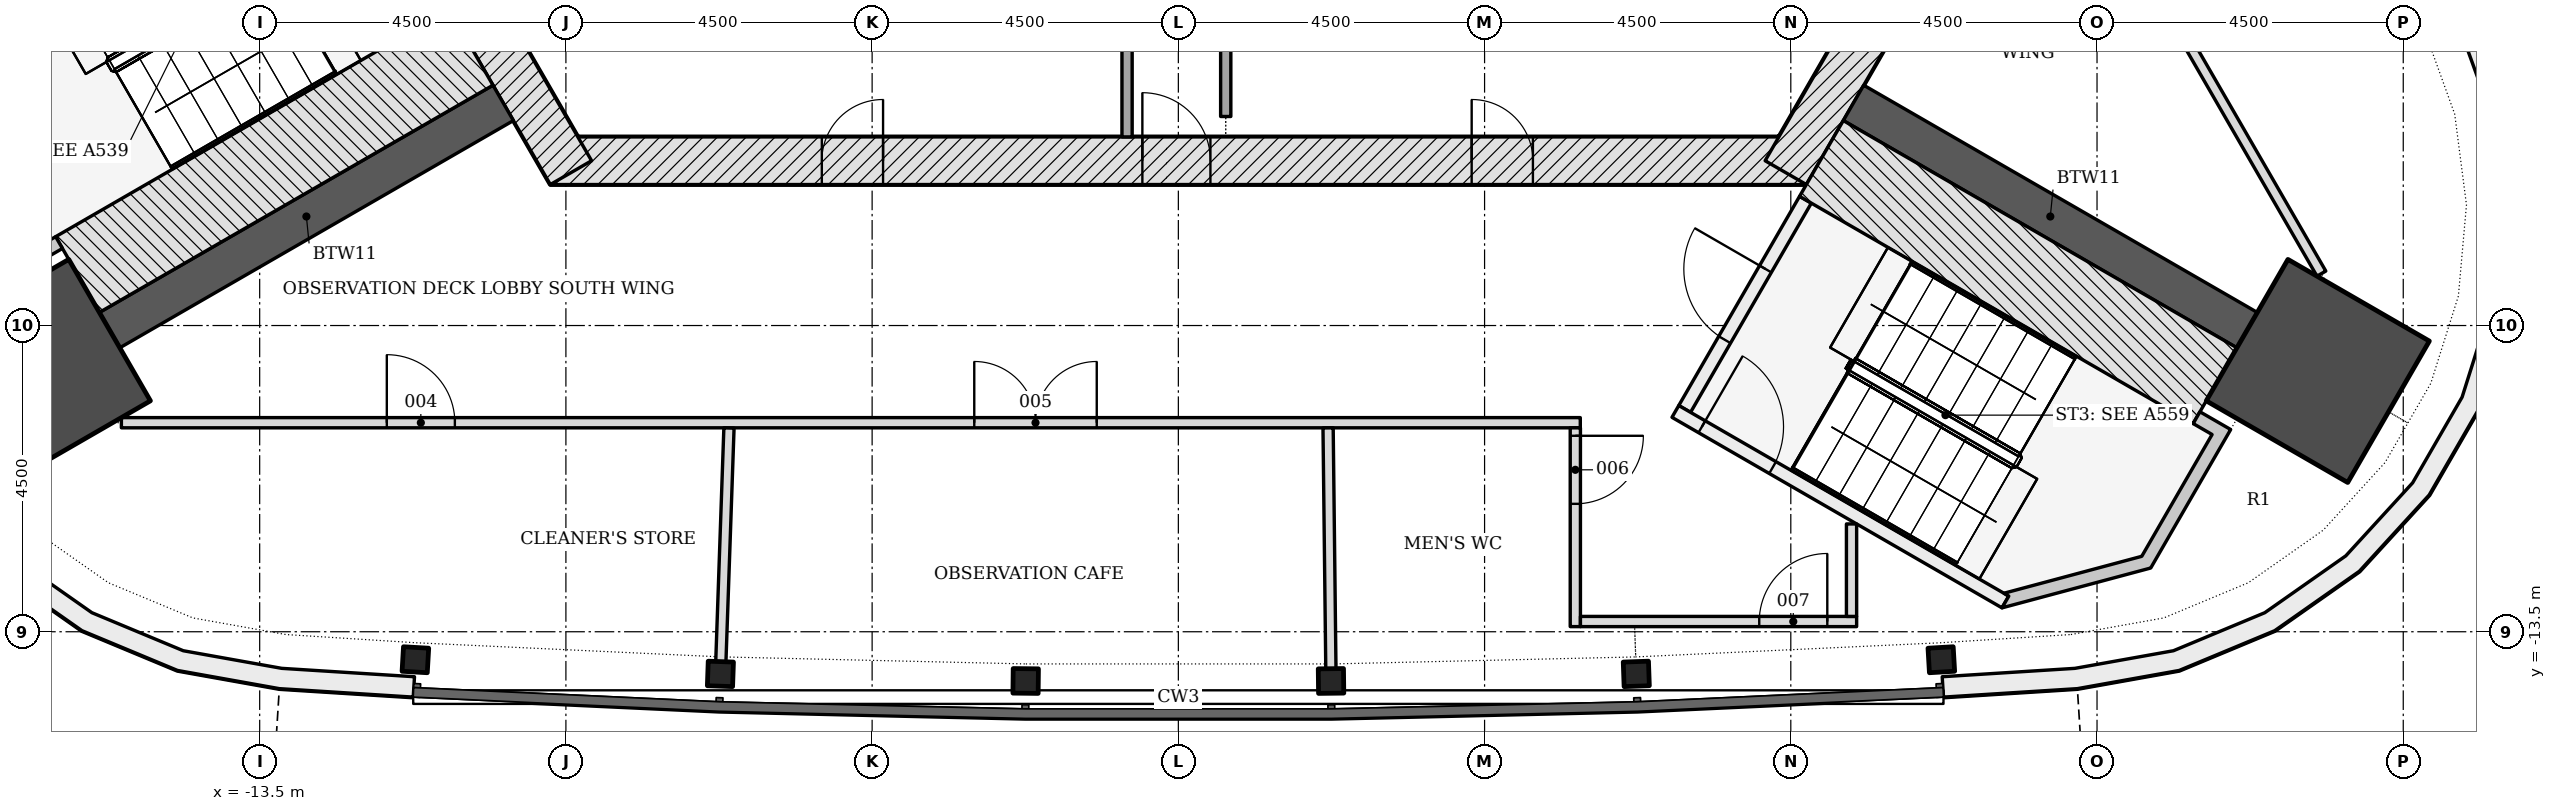
"""IFC4 building model, lengths in metres.
Left out: names, types, materials, properties, quantities, classifications, styles, units other than length and angle.
Written with IfcOpenShell. Run it as: python <this file> out.ifc"""

import sys

from ifc_helpers import new_model, si_unit, direction, frame, frame_2d, origin, origin_2d, place, context, subcontext, project, spatial, polyline, rectangle, i_section, outline, extrude, element, fill, save


model = new_model("IFC4")
c1 = context("Model", 3, precision=1e-05, world=origin(), true_north=direction((0.0, 1.0)))
c2 = subcontext(c1, "Body", "Model", "MODEL_VIEW")
j1 = project(units=[si_unit("LENGTHUNIT", "METRE"), si_unit("PLANEANGLEUNIT", "RADIAN")], contexts=[c1])
p1 = place(None, origin())
s1 = spatial("IfcSite", under=j1, at=p1, CompositionType="ELEMENT")
p2 = place(p1, origin())
s2 = spatial("IfcBuilding", under=s1, at=p2, CompositionType="ELEMENT")
p3 = place(p2, frame((0.0, 0.0, 274.2)))
s3 = spatial("IfcBuildingStorey", under=s2, at=p3, CompositionType="ELEMENT", Elevation=274.2)
p4 = place(p3, frame((-9.229, -6.578, -0.2), z_axis=(0.0, 0.0, 1.0), x_axis=(1.0, 0.0, 0.0)))
e1 = element("IfcWall", 1, at=p4, inside=s3, PredefinedType="SHEAR", context=c2, shape_type="SweptSolid", body=[
    extrude(rectangle(XDim=18.458, YDim=0.7, at=frame_2d((9.229, 0.0))), origin(), (0.0, 0.0, 1.0), 5.35),
])
p5 = place(p4, frame((8.7, 0.0, 0.2)))
e2 = element("IfcOpeningElement", 2, at=p5, cuts=e1, PredefinedType="OPENING", context=c2, shape_type="SweptSolid", body=[
    extrude(rectangle(XDim=1.0, YDim=2.1, at=frame_2d((0.5, 1.05))), frame((0.0, 0.36, 0.0), z_axis=(0.0, -1.0, 0.0), x_axis=(1.0, 0.0, 0.0)), (0.0, 0.0, 1.0), 0.72),
])
p6 = place(p4, frame((3.99, 0.0, 0.2)))
e3 = element("IfcOpeningElement", 3, at=p6, cuts=e1, PredefinedType="OPENING", context=c2, shape_type="SweptSolid", body=[
    extrude(rectangle(XDim=0.9, YDim=2.1, at=frame_2d((0.45, 1.05))), frame((0.0, 0.36, 0.0), z_axis=(0.0, -1.0, 0.0), x_axis=(1.0, 0.0, 0.0)), (0.0, 0.0, 1.0), 0.72),
])
p7 = place(p4, frame((13.539, 0.0, 0.2)))
e4 = element("IfcOpeningElement", 4, at=p7, cuts=e1, PredefinedType="OPENING", context=c2, shape_type="SweptSolid", body=[
    extrude(rectangle(XDim=0.9, YDim=2.1, at=frame_2d((0.45, 1.05))), frame((0.0, 0.36, 0.0), z_axis=(0.0, -1.0, 0.0), x_axis=(1.0, 0.0, 0.0)), (0.0, 0.0, 1.0), 0.72),
])
for number, where, z_axis, x_axis in (
    (5, (8.926, -6.753, -0.2), (0.0, 0.0, 1.0), (0.5, 0.866, 0.0)),
    (6, (-10.311, -4.353, -0.2), (0.0, 0.0, 1.0), (0.5, -0.866, 0.0)),
):
    element("IfcWall", number, at=place(p3, frame(where, z_axis=z_axis, x_axis=x_axis)), inside=s3, PredefinedType="SHEAR", context=c2, shape_type="SweptSolid", body=[
        extrude(rectangle(XDim=2.771, YDim=0.7, at=frame_2d((1.386, 0.0))), origin(), (0.0, 0.0, 1.0), 5.35),
    ])
for number, where, z_axis, x_axis in (
    (7, (-9.922, -5.728, -0.2), (0.0, 0.0, 1.0), (-0.866, -0.5, 0.0)),
    (8, (9.922, -5.728, -0.2), (0.0, 0.0, 1.0), (0.866, -0.5, 0.0)),
):
    element("IfcWall", number, at=place(p3, frame(where, z_axis=z_axis, x_axis=x_axis)), inside=s3, PredefinedType="SHEAR", context=c2, shape_type="SweptSolid", body=[
        extrude(rectangle(XDim=6.678, YDim=0.6, at=frame_2d((3.339, 0.0))), origin(), (0.0, 0.0, 1.0), 5.35),
    ])
for number, where, z_axis, x_axis in (
    (9, (-16.745, -9.667, -0.2), (0.0, 0.0, 1.0), (-0.866, -0.5, 0.0)),
    (10, (16.745, -9.667, -0.2), (0.0, 0.0, 1.0), (0.866, -0.5, 0.0)),
):
    element("IfcColumn", number, at=place(p3, frame(where, z_axis=z_axis, x_axis=x_axis)), inside=s3, PredefinedType="COLUMN", context=c2, shape_type="SweptSolid", body=[
        extrude(rectangle(XDim=2.4, YDim=2.4, at=origin_2d()), origin(), (0.0, 0.0, 1.0), 5.35),
    ])
for number, where, z_axis, x_axis in (
    (11, (-11.212, -13.911, -0.2), (0.0, 0.0, 1.0), (0.998, -0.058, 0.0)),
    (12, (-6.729, -14.119, -0.2), (0.0, 0.0, 1.0), (0.999, -0.035, 0.0)),
    (13, (-2.244, -14.224, -0.2), (0.0, 0.0, 1.0), (1.0, -0.012, 0.0)),
    (14, (2.244, -14.224, -0.2), (0.0, 0.0, 1.0), (1.0, 0.012, 0.0)),
    (15, (6.729, -14.119, -0.2), (0.0, 0.0, 1.0), (0.999, 0.035, 0.0)),
    (16, (11.212, -13.911, -0.2), (0.0, 0.0, 1.0), (0.998, 0.058, 0.0)),
):
    element("IfcColumn", number, at=place(p3, frame(where, z_axis=z_axis, x_axis=x_axis)), inside=s3, PredefinedType="COLUMN", context=c2, shape_type="SweptSolid", body=[
        extrude(i_section(OverallWidth=0.371, OverallDepth=0.361, WebThickness=0.012, FlangeThickness=0.02, FilletRadius=0.015, at=origin_2d()), origin(), (0.0, 0.0, 1.0), 5.35),
    ])
p8 = place(p3, origin())
e17 = element("IfcWall", 17, at=p8, inside=s3, PredefinedType="NOTDEFINED", context=c2, shape_type="SweptSolid", body=[
    extrude(outline(polyline([(-18.145, -2.507), (-19.021, -4.273), (-19.538, -5.703), (-19.733, -7.21), (-19.599, -8.724), (-19.141, -10.174), (-18.381, -11.49), (-17.355, -12.611), (-16.111, -13.485), (-14.708, -14.069), (-13.211, -14.336), (-11.244, -14.46), (-11.225, -14.161), (-13.176, -14.038), (-14.623, -13.779), (-15.965, -13.22), (-17.156, -12.385), (-18.138, -11.312), (-18.865, -10.052), (-19.303, -8.665), (-19.432, -7.216), (-19.244, -5.774), (-18.745, -4.391), (-17.876, -2.64), (-18.145, -2.507)])), origin(), (0.0, 0.0, 1.0), 5.15),
])
p9 = place(p3, origin())
e18 = element("IfcWall", 18, at=p9, inside=s3, PredefinedType="NOTDEFINED", context=c2, shape_type="SweptSolid", body=[
    extrude(outline(polyline([(11.244, -14.46), (13.211, -14.336), (14.708, -14.069), (16.111, -13.485), (17.355, -12.611), (18.381, -11.49), (19.141, -10.174), (19.599, -8.724), (19.733, -7.21), (19.538, -5.703), (19.021, -4.273), (18.145, -2.507), (17.876, -2.64), (18.745, -4.391), (19.244, -5.774), (19.432, -7.216), (19.303, -8.665), (18.865, -10.052), (18.138, -11.312), (17.156, -12.385), (15.965, -13.22), (14.623, -13.779), (13.176, -14.038), (11.225, -14.161), (11.244, -14.46)])), origin(), (0.0, 0.0, 1.0), 5.15),
])
p10 = place(p3, frame((-0.754, 5.272, 0.0), z_axis=(0.0, 0.0, 1.0), x_axis=(0.0, -1.0, 0.0)))
e19 = element("IfcWall", 19, at=p10, inside=s3, PredefinedType="PARTITIONING", context=c2, shape_type="SweptSolid", body=[
    extrude(rectangle(XDim=11.5, YDim=0.15, at=frame_2d((5.75, 0.0))), origin(), (0.0, 0.0, 1.0), 5.15),
])
p11 = place(p10, frame((3.701, 0.0, 0.0)))
e20 = element("IfcOpeningElement", 20, at=p11, cuts=e19, PredefinedType="OPENING", context=c2, shape_type="SweptSolid", body=[
    extrude(rectangle(XDim=0.9, YDim=2.1, at=frame_2d((0.45, 1.05))), frame((0.0, 0.085, 0.0), z_axis=(0.0, -1.0, 0.0), x_axis=(1.0, 0.0, 0.0)), (0.0, 0.0, 1.0), 0.17),
])
p12 = place(p3, frame((0.696, -5.928, 0.0), z_axis=(0.0, 0.0, 1.0), x_axis=(0.0, 1.0, 0.0)))
e21 = element("IfcWall", 21, at=p12, inside=s3, PredefinedType="PARTITIONING", context=c2, shape_type="SweptSolid", body=[
    extrude(rectangle(XDim=11.549, YDim=0.15, at=frame_2d((5.774, 0.0))), origin(), (0.0, 0.0, 1.0), 5.15),
])
p13 = place(p12, frame((6.6, 0.0, 0.0)))
e22 = element("IfcOpeningElement", 22, at=p13, cuts=e21, PredefinedType="OPENING", context=c2, shape_type="SweptSolid", body=[
    extrude(rectangle(XDim=0.9, YDim=2.1, at=frame_2d((0.45, 1.05))), frame((0.0, 0.085, 0.0), z_axis=(0.0, -1.0, 0.0), x_axis=(1.0, 0.0, 0.0)), (0.0, 0.0, 1.0), 0.17),
])
p14 = place(p3, frame((-10.393, -4.912, -0.2), z_axis=(0.0, 0.0, 1.0), x_axis=(-0.866025486527, -0.499999856685, 0.0)))
e23 = element("IfcWall", 23, at=p14, inside=s3, PredefinedType="SHEAR", context=c2, shape_type="SweptSolid", body=[
    extrude(rectangle(XDim=6.679, YDim=1.286, at=frame_2d((3.339, 0.0))), origin(), (0.0, 0.0, 1.0), 5.35),
])
p15 = place(p3, frame((0.0, 0.0, -0.2)))
e24 = element("IfcWall", 24, at=p15, inside=s3, PredefinedType="SHEAR", context=c2, shape_type="SweptSolid", body=[
    extrude(outline(polyline([(-17.439, -3.907), (-18.025, -6.093), (-16.85, -8.128), (-16.398, -7.867), (-16.498, -7.694), (-16.498, -7.694), (-16.777, -7.855), (-17.81, -6.065), (-17.267, -4.039), (-17.339, -4.081), (-17.339, -4.081), (-17.339, -4.081), (-17.339, -4.081), (-17.339, -4.081), (-17.339, -4.081), (-17.339, -4.081), (-17.339, -4.081), (-17.339, -4.081), (-17.339, -4.081), (-17.339, -4.081), (-17.339, -4.081), (-17.339, -4.081), (-17.339, -4.081), (-17.339, -4.081), (-17.339, -4.081), (-17.339, -4.081), (-17.439, -3.907)])), origin(), (0.0, 0.0, 1.0), 5.35),
])
p16 = place(p3, frame((7.44, -10.226, -0.2), z_axis=(0.0, 0.0, 1.0), x_axis=(0.500022077904, 0.866012656725, 0.0)))
e25 = element("IfcWall", 25, at=p16, inside=s3, PredefinedType="SHEAR", context=c2, shape_type="SweptSolid", body=[
    extrude(rectangle(XDim=3.55, YDim=0.2, at=frame_2d((1.775, 0.0))), origin(), (0.0, 0.0, 1.0), 5.35),
])
p17 = place(p16, frame((1.175, 0.0, 0.2)))
e26 = element("IfcOpeningElement", 26, at=p17, cuts=e25, PredefinedType="OPENING", context=c2, shape_type="SweptSolid", body=[
    extrude(rectangle(XDim=1.2, YDim=2.1, at=frame_2d((0.6, 1.05))), frame((0.0, 0.11, 0.0), z_axis=(0.0, -1.0, 0.0), x_axis=(1.0, 0.0, 0.0)), (0.0, 0.0, 1.0), 0.22),
])
p18 = place(p3, frame((7.304, -10.262, -0.2), z_axis=(0.0, 0.0, 1.0), x_axis=(0.866026594901, -0.49999793692, 0.0)))
e27 = element("IfcWall", 27, at=p18, inside=s3, PredefinedType="SHEAR", context=c2, shape_type="SweptSolid", body=[
    extrude(rectangle(XDim=5.6, YDim=0.2, at=frame_2d((2.8, 0.0))), origin(), (0.0, 0.0, 1.0), 5.35),
])
p19 = place(p18, frame((0.45, 0.0, 0.2)))
e28 = element("IfcOpeningElement", 28, at=p19, cuts=e27, PredefinedType="OPENING", context=c2, shape_type="SweptSolid", body=[
    extrude(rectangle(XDim=1.2, YDim=2.1, at=frame_2d((0.6, 1.05))), frame((0.0, 0.11, 0.0), z_axis=(0.0, -1.0, 0.0), x_axis=(1.0, 0.0, 0.0)), (0.0, 0.0, 1.0), 0.22),
])
p20 = place(p3, frame((9.45, -6.545, -0.2), z_axis=(0.0, 0.0, 1.0), x_axis=(0.866016347338, -0.500015685897, 0.0)))
e29 = element("IfcWall", 29, at=p20, inside=s3, PredefinedType="SHEAR", context=c2, shape_type="SweptSolid", body=[
    extrude(rectangle(XDim=6.678, YDim=1.286, at=frame_2d((3.339, 0.0))), origin(), (0.0, 0.0, 1.0), 5.35),
])
p21 = place(p3, frame((0.0, 0.0, -0.2)))
e30 = element("IfcWall", 30, at=p21, inside=s3, PredefinedType="SHEAR", context=c2, shape_type="SweptSolid", body=[
    extrude(outline(polyline([(12.104, -13.149), (14.289, -12.563), (15.464, -10.528), (15.013, -10.268), (14.913, -10.441), (15.191, -10.601), (14.157, -12.392), (12.132, -12.934), (12.204, -12.976), (12.204, -12.976), (12.204, -12.976), (12.204, -12.976), (12.204, -12.976), (12.204, -12.976), (12.204, -12.976), (12.204, -12.976), (12.204, -12.976), (12.204, -12.976), (12.204, -12.976), (12.204, -12.976), (12.204, -12.976), (12.204, -12.976), (12.204, -12.976), (12.204, -12.976), (12.204, -12.976), (12.104, -13.149)])), origin(), (0.0, 0.0, 1.0), 5.35),
])
p22 = place(p3, frame((-15.532, -10.428, 0.0), z_axis=(0.0, 0.0, 1.0), x_axis=(1.0, 0.0, 0.0)))
e31 = element("IfcWall", 31, at=p22, inside=s3, PredefinedType="PARTITIONING", context=c2, shape_type="SweptSolid", body=[
    extrude(rectangle(XDim=21.439, YDim=0.15, at=frame_2d((10.719, 0.0))), origin(), (0.0, 0.0, 1.0), 4.602),
])
p23 = place(p22, frame((3.901, 0.0, 0.0)))
e32 = element("IfcOpeningElement", 32, at=p23, cuts=e31, PredefinedType="OPENING", context=c2, shape_type="SweptSolid", body=[
    extrude(rectangle(XDim=1.0, YDim=2.1, at=frame_2d((0.5, 1.05))), frame((0.0, 0.085, 0.0), z_axis=(0.0, -1.0, 0.0), x_axis=(1.0, 0.0, 0.0)), (0.0, 0.0, 1.0), 0.17),
])
p24 = place(p22, frame((12.533, 0.0, 0.0)))
e33 = element("IfcOpeningElement", 33, at=p24, cuts=e31, PredefinedType="OPENING", context=c2, shape_type="SweptSolid", body=[
    extrude(rectangle(XDim=1.8, YDim=2.1, at=frame_2d((0.9, 1.05))), frame((0.0, 0.085, 0.0), z_axis=(0.0, -1.0, 0.0), x_axis=(1.0, 0.0, 0.0)), (0.0, 0.0, 1.0), 0.17),
])
p25 = place(p3, frame((-6.723, -13.945, 0.0), z_axis=(0.0, 0.0, 1.0), x_axis=(0.034767749757, 0.999395419029, 0.0)))
e34 = element("IfcWall", 34, at=p25, inside=s3, PredefinedType="PARTITIONING", context=c2, shape_type="SweptSolid", body=[
    extrude(rectangle(XDim=3.441, YDim=0.15, at=frame_2d((1.72, 0.0))), origin(), (0.0, 0.0, 1.0), 4.602),
])
p26 = place(p3, frame((2.2, -10.504, 0.0), z_axis=(0.0, 0.0, 1.0), x_axis=(0.011571067151, -0.999933052962, 0.0)))
e35 = element("IfcWall", 35, at=p26, inside=s3, PredefinedType="PARTITIONING", context=c2, shape_type="SweptSolid", body=[
    extrude(rectangle(XDim=3.545, YDim=0.15, at=frame_2d((1.772, 0.0))), origin(), (0.0, 0.0, 1.0), 4.602),
])
p27 = place(p3, frame((5.833, -10.503, 0.0), z_axis=(0.0, 0.0, 1.0), x_axis=(0.0, -1.0, 0.0)))
e36 = element("IfcWall", 36, at=p27, inside=s3, PredefinedType="PARTITIONING", context=c2, shape_type="SweptSolid", body=[
    extrude(rectangle(XDim=2.922, YDim=0.15, at=frame_2d((1.461, 0.0))), origin(), (0.0, 0.0, 1.0), 5.15),
])
p28 = place(p27, frame((0.117, 0.0, 0.0)))
e37 = element("IfcOpeningElement", 37, at=p28, cuts=e36, PredefinedType="OPENING", context=c2, shape_type="SweptSolid", body=[
    extrude(rectangle(XDim=1.0, YDim=2.1, at=frame_2d((0.5, 1.05))), frame((0.0, 0.085, 0.0), z_axis=(0.0, -1.0, 0.0), x_axis=(1.0, 0.0, 0.0)), (0.0, 0.0, 1.0), 0.17),
])
p29 = place(p3, frame((5.909, -13.35, 0.0), z_axis=(0.0, 0.0, 1.0), x_axis=(1.0, 0.0, 0.0)))
e38 = element("IfcWall", 38, at=p29, inside=s3, PredefinedType="PARTITIONING", context=c2, shape_type="SweptSolid", body=[
    extrude(rectangle(XDim=4.059, YDim=0.15, at=frame_2d((2.029, 0.0))), origin(), (0.0, 0.0, 1.0), 4.602),
])
p30 = place(p29, frame((2.628, 0.0, 0.0)))
e39 = element("IfcOpeningElement", 39, at=p30, cuts=e38, PredefinedType="OPENING", context=c2, shape_type="SweptSolid", body=[
    extrude(rectangle(XDim=1.0, YDim=2.1, at=frame_2d((0.5, 1.05))), frame((0.0, 0.085, 0.0), z_axis=(0.0, -1.0, 0.0), x_axis=(1.0, 0.0, 0.0)), (0.0, 0.0, 1.0), 0.17),
])
p31 = place(p3, frame((9.893, -13.275, 0.0), z_axis=(0.0, 0.0, 1.0), x_axis=(0.0, 1.0, 0.0)))
e40 = element("IfcWall", 40, at=p31, inside=s3, PredefinedType="PARTITIONING", context=c2, shape_type="SweptSolid", body=[
    extrude(rectangle(XDim=1.359, YDim=0.15, at=frame_2d((0.68, 0.0))), origin(), (0.0, 0.0, 1.0), 5.15),
])
p32 = place(p3, frame((6.078, 10.329, 0.0), z_axis=(0.0, 0.0, 1.0), x_axis=(0.499992222505, -0.866029894076, 0.0)))
e41 = element("IfcWall", 41, at=p32, inside=s3, PredefinedType="PARTITIONING", context=c2, shape_type="SweptSolid", body=[
    extrude(rectangle(XDim=21.439, YDim=0.15, at=frame_2d((10.719, 0.0))), origin(), (0.0, 0.0, 1.0), 4.602),
])
p33 = place(p32, frame((14.337, 0.0, 0.0)))
e42 = element("IfcOpeningElement", 42, at=p33, cuts=e41, PredefinedType="OPENING", context=c2, shape_type="SweptSolid", body=[
    extrude(rectangle(XDim=1.0, YDim=2.1, at=frame_2d((0.5, 1.05))), frame((0.0, 0.085, 0.0), z_axis=(0.0, -1.0, 0.0), x_axis=(1.0, 0.0, 0.0)), (0.0, 0.0, 1.0), 0.17),
])
p34 = place(p32, frame((5.51, 0.0, 0.0)))
e43 = element("IfcOpeningElement", 43, at=p34, cuts=e41, PredefinedType="OPENING", context=c2, shape_type="SweptSolid", body=[
    extrude(rectangle(XDim=1.0, YDim=2.1, at=frame_2d((0.5, 1.05))), frame((0.0, 0.085, 0.0), z_axis=(0.0, -1.0, 0.0), x_axis=(1.0, 0.0, 0.0)), (0.0, 0.0, 1.0), 0.17),
])
p35 = place(p5, origin())
e44 = element("IfcDoor", 44, at=p35, inside=s3, OperationType="SINGLE_SWING_LEFT", PredefinedType="DOOR", context=c2, shape_type="SweptSolid", body=[
    extrude(rectangle(XDim=1.0, YDim=2.1, at=frame_2d((0.5, 1.05))), frame((0.0, 0.075, 0.0), z_axis=(0.0, -1.0, 0.0), x_axis=(1.0, 0.0, 0.0)), (0.0, 0.0, 1.0), 0.15),
])
fill(e2, e44)
p36 = place(p6, origin())
e45 = element("IfcDoor", 45, at=p36, inside=s3, OperationType="SINGLE_SWING_RIGHT", PredefinedType="DOOR", context=c2, shape_type="SweptSolid", body=[
    extrude(rectangle(XDim=0.9, YDim=2.1, at=frame_2d((0.45, 1.05))), frame((0.0, 0.075, 0.0), z_axis=(0.0, -1.0, 0.0), x_axis=(1.0, 0.0, 0.0)), (0.0, 0.0, 1.0), 0.15),
])
fill(e3, e45)
p37 = place(p7, origin())
e46 = element("IfcDoor", 46, at=p37, inside=s3, OperationType="SINGLE_SWING_LEFT", PredefinedType="DOOR", context=c2, shape_type="SweptSolid", body=[
    extrude(rectangle(XDim=0.9, YDim=2.1, at=frame_2d((0.45, 1.05))), frame((0.0, 0.075, 0.0), z_axis=(0.0, -1.0, 0.0), x_axis=(1.0, 0.0, 0.0)), (0.0, 0.0, 1.0), 0.15),
])
fill(e4, e46)
p38 = place(p17, origin())
e47 = element("IfcDoor", 47, at=p38, inside=s3, OperationType="SINGLE_SWING_RIGHT", PredefinedType="DOOR", context=c2, shape_type="SweptSolid", body=[
    extrude(rectangle(XDim=1.2, YDim=2.1, at=frame_2d((0.6, 1.05))), frame((0.0, 0.025, 0.0), z_axis=(0.0, -1.0, 0.0), x_axis=(1.0, 0.0, 0.0)), (0.0, 0.0, 1.0), 0.05),
])
fill(e26, e47)
p39 = place(p19, origin())
e48 = element("IfcDoor", 48, at=p39, inside=s3, OperationType="SINGLE_SWING_LEFT", PredefinedType="DOOR", context=c2, shape_type="SweptSolid", body=[
    extrude(rectangle(XDim=1.2, YDim=2.1, at=frame_2d((0.6, 1.05))), frame((0.0, 0.025, 0.0), z_axis=(0.0, -1.0, 0.0), x_axis=(1.0, 0.0, 0.0)), (0.0, 0.0, 1.0), 0.05),
])
fill(e28, e48)
p40 = place(p23, origin())
e49 = element("IfcDoor", 49, at=p40, inside=s3, OperationType="SINGLE_SWING_LEFT", PredefinedType="DOOR", context=c2, shape_type="SweptSolid", body=[
    extrude(rectangle(XDim=1.0, YDim=2.1, at=frame_2d((0.5, 1.05))), frame((0.0, 0.025, 0.0), z_axis=(0.0, -1.0, 0.0), x_axis=(1.0, 0.0, 0.0)), (0.0, 0.0, 1.0), 0.05),
])
fill(e32, e49)
p41 = place(p24, origin())
e50 = element("IfcDoor", 50, at=p41, inside=s3, OperationType="DOUBLE_DOOR_SINGLE_SWING", PredefinedType="DOOR", context=c2, shape_type="SweptSolid", body=[
    extrude(rectangle(XDim=1.8, YDim=2.1, at=frame_2d((0.9, 1.05))), frame((0.0, 0.025, 0.0), z_axis=(0.0, -1.0, 0.0), x_axis=(1.0, 0.0, 0.0)), (0.0, 0.0, 1.0), 0.05),
])
fill(e33, e50)
p42 = place(p28, origin())
e51 = element("IfcDoor", 51, at=p42, inside=s3, OperationType="SINGLE_SWING_LEFT", PredefinedType="DOOR", context=c2, shape_type="SweptSolid", body=[
    extrude(rectangle(XDim=1.0, YDim=2.1, at=frame_2d((0.5, 1.05))), frame((0.0, 0.025, 0.0), z_axis=(0.0, -1.0, 0.0), x_axis=(1.0, 0.0, 0.0)), (0.0, 0.0, 1.0), 0.05),
])
fill(e37, e51)
p43 = place(p30, origin())
e52 = element("IfcDoor", 52, at=p43, inside=s3, OperationType="SINGLE_SWING_RIGHT", PredefinedType="DOOR", context=c2, shape_type="SweptSolid", body=[
    extrude(rectangle(XDim=1.0, YDim=2.1, at=frame_2d((0.5, 1.05))), frame((0.0, 0.025, 0.0), z_axis=(0.0, -1.0, 0.0), x_axis=(1.0, 0.0, 0.0)), (0.0, 0.0, 1.0), 0.05),
])
fill(e39, e52)
save(model, sys.argv[1])
